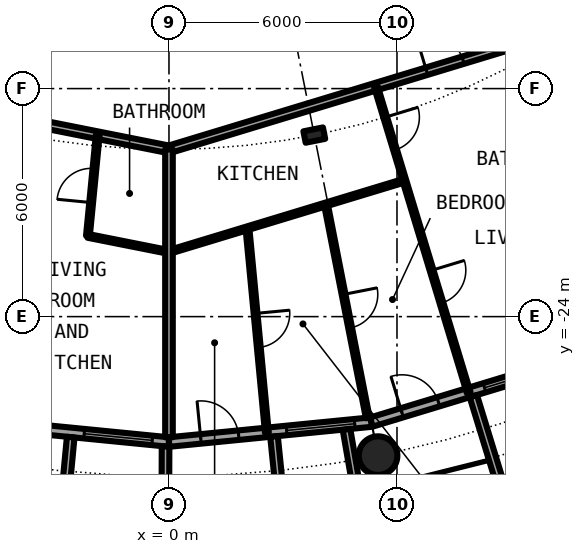
"""IFC4 building model, lengths in metres.
Left out: names, types, materials, properties, quantities, classifications, styles, units other than length and angle.
Written with IfcOpenShell. Run it as: python <this file> out.ifc"""

import sys

from ifc_helpers import new_model, si_unit, direction, frame, frame_2d, origin, origin_2d, place, context, subcontext, project, spatial, rectangle, circle, hollow_circle, i_section, extrude, element, fill, save


model = new_model("IFC4")
c1 = context("Model", 3, precision=1e-05, world=origin(), true_north=direction((0.0, 1.0)))
c2 = subcontext(c1, "Body", "Model", "MODEL_VIEW")
j1 = project(units=[si_unit("LENGTHUNIT", "METRE"), si_unit("PLANEANGLEUNIT", "RADIAN")], contexts=[c1])
p1 = place(None, origin())
s1 = spatial("IfcSite", under=j1, at=p1, CompositionType="ELEMENT")
p2 = place(p1, origin())
s2 = spatial("IfcBuilding", under=s1, at=p2, CompositionType="ELEMENT")
p3 = place(p2, frame((0.0, 0.0, 88.0)))
s3 = spatial("IfcBuildingStorey", under=s2, at=p3, CompositionType="ELEMENT", Elevation=88.0)
p4 = place(p3, frame((5.501, -27.658, 0.0), z_axis=(0.0, 0.0, 1.0), x_axis=(1.0, 0.0, 0.0)))
e1 = element("IfcColumn", 1, at=p4, inside=s3, PredefinedType="COLUMN", context=c2, shape_type="SweptSolid", body=[
    extrude(hollow_circle(Radius=0.508, WallThickness=0.04, at=origin_2d()), origin(), (0.0, 0.0, 1.0), 3.05),
])
p5 = place(p3, frame((3.824, -19.223, 0.0), z_axis=(0.0, 0.0, 1.0), x_axis=(0.195090322016, -0.980785280403, 0.0)))
e2 = element("IfcColumn", 2, at=p5, inside=s3, PredefinedType="COLUMN", context=c2, shape_type="SweptSolid", body=[
    extrude(i_section(OverallWidth=0.306, OverallDepth=0.524, WebThickness=0.021, FlangeThickness=0.04, FilletRadius=0.027, at=origin_2d()), origin(), (0.0, 0.0, 1.0), 3.05),
])
p6 = place(p3, frame((-5.326, -26.775, 0.0), z_axis=(0.0, 0.0, 1.0), x_axis=(0.995173996315, -0.098126026407, 0.0)))
e3 = element("IfcWall", 3, at=p6, inside=s3, PredefinedType="SOLIDWALL", context=c2, shape_type="SweptSolid", body=[
    extrude(rectangle(XDim=5.352, YDim=0.25, at=frame_2d((2.676, 0.0))), origin(), (0.0, 0.0, 1.0), 2.7),
])
p7 = place(p6, frame((0.841, 0.0, 0.0)))
e4 = element("IfcOpeningElement", 4, at=p7, cuts=e3, PredefinedType="OPENING", context=c2, shape_type="SweptSolid", body=[
    extrude(rectangle(XDim=1.0, YDim=2.2, at=frame_2d((0.5, 1.1))), frame((0.0, 0.135, 0.0), z_axis=(0.0, -1.0, 0.0), x_axis=(1.0, 0.0, 0.0)), (0.0, 0.0, 1.0), 0.27),
])
p8 = place(p6, frame((3.111, 0.0, 0.3)))
e5 = element("IfcOpeningElement", 5, at=p8, cuts=e3, PredefinedType="OPENING", context=c2, shape_type="SweptSolid", body=[
    extrude(rectangle(XDim=1.8, YDim=2.1, at=frame_2d((0.9, 1.05))), frame((0.0, 0.135, 0.0), z_axis=(0.0, -1.0, 0.0), x_axis=(1.0, 0.0, 0.0)), (0.0, 0.0, 1.0), 0.27),
])
p9 = place(p3, frame((-2.586, -27.171, -0.03), z_axis=(0.0, 0.0, 1.0), x_axis=(-0.094548432284, -0.995520262954, 0.0)))
e6 = element("IfcWall", 6, at=p9, inside=s3, PredefinedType="SOLIDWALL", context=c2, shape_type="SweptSolid", body=[
    extrude(rectangle(XDim=3.006, YDim=0.2, at=frame_2d((1.503, 0.0))), origin(), (0.0, 0.0, 1.0), 2.73),
])
p10 = place(p3, frame((-0.09, -27.417, -0.03), z_axis=(0.0, 0.0, 1.0), x_axis=(-0.00347308367, -0.999993968827, 0.0)))
e7 = element("IfcWall", 7, at=p10, inside=s3, PredefinedType="SOLIDWALL", context=c2, shape_type="SweptSolid", body=[
    extrude(rectangle(XDim=2.882, YDim=0.2, at=frame_2d((1.441, 0.0))), origin(), (0.0, 0.0, 1.0), 2.73),
])
p11 = place(p3, frame((0.0, -27.3, 0.0), z_axis=(0.0, 0.0, 1.0), x_axis=(0.995173996315, 0.098126026407, 0.0)))
e8 = element("IfcWall", 8, at=p11, inside=s3, PredefinedType="SOLIDWALL", context=c2, shape_type="SweptSolid", body=[
    extrude(rectangle(XDim=5.352, YDim=0.25, at=frame_2d((2.676, 0.0))), origin(), (0.0, 0.0, 1.0), 2.7),
])
p12 = place(p11, frame((0.841, 0.0, 0.0)))
e9 = element("IfcOpeningElement", 9, at=p12, cuts=e8, PredefinedType="OPENING", context=c2, shape_type="SweptSolid", body=[
    extrude(rectangle(XDim=1.0, YDim=2.2, at=frame_2d((0.5, 1.1))), frame((0.0, 0.135, 0.0), z_axis=(0.0, -1.0, 0.0), x_axis=(1.0, 0.0, 0.0)), (0.0, 0.0, 1.0), 0.27),
])
p13 = place(p11, frame((3.111, 0.0, 0.3)))
e10 = element("IfcOpeningElement", 10, at=p13, cuts=e8, PredefinedType="OPENING", context=c2, shape_type="SweptSolid", body=[
    extrude(rectangle(XDim=1.8, YDim=2.1, at=frame_2d((0.9, 1.05))), frame((0.0, 0.135, 0.0), z_axis=(0.0, -1.0, 0.0), x_axis=(1.0, 0.0, 0.0)), (0.0, 0.0, 1.0), 0.27),
])
p14 = place(p3, frame((2.764, -27.153, -0.03), z_axis=(0.0, 0.0, 1.0), x_axis=(0.101505487237, -0.994834979311, 0.0)))
e11 = element("IfcWall", 11, at=p14, inside=s3, PredefinedType="SOLIDWALL", context=c2, shape_type="SweptSolid", body=[
    extrude(rectangle(XDim=3.007, YDim=0.2, at=frame_2d((1.503, 0.0))), origin(), (0.0, 0.0, 1.0), 2.73),
])
p15 = place(p3, frame((4.671, -26.966, -0.03), z_axis=(0.0, 0.0, 1.0), x_axis=(0.170539878907, -0.985350774954, 0.0)))
e12 = element("IfcWall", 12, at=p15, inside=s3, PredefinedType="SOLIDWALL", context=c2, shape_type="SweptSolid", body=[
    extrude(rectangle(XDim=2.932, YDim=0.2, at=frame_2d((1.466, 0.0))), origin(), (0.0, 0.0, 1.0), 2.73),
])
p16 = place(p3, frame((5.326, -26.775, 0.0), z_axis=(0.0, 0.0, 1.0), x_axis=(0.956965678721, 0.290201119486, 0.0)))
e13 = element("IfcWall", 13, at=p16, inside=s3, PredefinedType="SOLIDWALL", context=c2, shape_type="SweptSolid", body=[
    extrude(rectangle(XDim=5.351, YDim=0.25, at=frame_2d((2.676, 0.0))), origin(), (0.0, 0.0, 1.0), 2.7),
])
p17 = place(p16, frame((0.841, 0.0, 0.0)))
e14 = element("IfcOpeningElement", 14, at=p17, cuts=e13, PredefinedType="OPENING", context=c2, shape_type="SweptSolid", body=[
    extrude(rectangle(XDim=1.0, YDim=2.2, at=frame_2d((0.5, 1.1))), frame((0.0, 0.135, 0.0), z_axis=(0.0, -1.0, 0.0), x_axis=(1.0, 0.0, 0.0)), (0.0, 0.0, 1.0), 0.27),
])
p18 = place(p16, frame((3.111, 0.0, 0.3)))
e15 = element("IfcOpeningElement", 15, at=p18, cuts=e13, PredefinedType="OPENING", context=c2, shape_type="SweptSolid", body=[
    extrude(rectangle(XDim=1.8, YDim=2.1, at=frame_2d((0.9, 1.05))), frame((0.0, 0.135, 0.0), z_axis=(0.0, -1.0, 0.0), x_axis=(1.0, 0.0, 0.0)), (0.0, 0.0, 1.0), 0.27),
])
p19 = place(p3, frame((8.82, -29.093, -0.03), z_axis=(0.0, 0.0, 1.0), x_axis=(0.941461077774, 0.337121697664, 0.0)))
e16 = element("IfcWall", 16, at=p19, inside=s3, PredefinedType="SOLIDWALL", context=c2, shape_type="SweptSolid", body=[
    extrude(rectangle(XDim=2.993, YDim=0.2, at=frame_2d((1.497, 0.0))), origin(), (0.0, 0.0, 1.0), 2.73),
])
p20 = place(p19, frame((0.457, 0.0, 0.33)))
e17 = element("IfcOpeningElement", 17, at=p20, cuts=e16, PredefinedType="OPENING", context=c2, shape_type="SweptSolid", body=[
    extrude(circle(Radius=1.04, at=frame_2d((1.04, 1.04))), frame((0.0, 0.11, 0.0), z_axis=(0.0, -1.0, 0.0), x_axis=(1.0, 0.0, 0.0)), (0.0, 0.0, 1.0), 0.22),
])
p21 = place(p3, frame((8.009, -26.092, -0.03), z_axis=(0.0, 0.0, 1.0), x_axis=(0.293406695073, -0.955987715029, 0.0)))
e18 = element("IfcWall", 18, at=p21, inside=s3, PredefinedType="SOLIDWALL", context=c2, shape_type="SweptSolid", body=[
    extrude(rectangle(XDim=3.006, YDim=0.2, at=frame_2d((1.503, 0.0))), origin(), (0.0, 0.0, 1.0), 2.73),
])
p22 = place(p3, frame((-2.133, -21.876, 0.0), z_axis=(0.0, 0.0, 1.0), x_axis=(0.980804550577, -0.194993419292, 0.0)))
e19 = element("IfcWall", 19, at=p22, inside=s3, PredefinedType="PARTITIONING", context=c2, shape_type="SweptSolid", body=[
    extrude(rectangle(XDim=2.175, YDim=0.1, at=frame_2d((1.087, 0.0))), origin(), (0.0, 0.0, 1.0), 2.7),
])
p23 = place(p3, frame((0.0, -22.3, 0.0), z_axis=(0.0, 0.0, 1.0), x_axis=(0.956940987612, 0.290282528286, 0.0)))
e20 = element("IfcWall", 20, at=p23, inside=s3, PredefinedType="PARTITIONING", context=c2, shape_type="SweptSolid", body=[
    extrude(rectangle(XDim=6.477, YDim=0.1, at=frame_2d((3.238, 0.0))), origin(), (0.0, 0.0, 1.0), 2.7),
])
p24 = place(p3, frame((-7.501, -18.108, 0.0), z_axis=(0.0, 0.0, 1.0), x_axis=(0.980781515054, -0.195109250749, 0.0)))
e21 = element("IfcWall", 21, at=p24, inside=s3, PredefinedType="PARTITIONING", context=c2, shape_type="SweptSolid", body=[
    extrude(rectangle(XDim=7.648, YDim=0.2, at=frame_2d((3.824, 0.0))), origin(), (0.0, 0.0, 1.0), 2.38),
])
p25 = place(p24, frame((2.25, 0.0, 0.0)))
e22 = element("IfcOpeningElement", 22, at=p25, cuts=e21, PredefinedType="OPENING", context=c2, shape_type="SweptSolid", body=[
    extrude(rectangle(XDim=1.0, YDim=2.3, at=frame_2d((0.5, 1.15))), frame((0.0, 0.11, 0.0), z_axis=(0.0, -1.0, 0.0), x_axis=(1.0, 0.0, 0.0)), (0.0, 0.0, 1.0), 0.22),
])
p26 = place(p3, frame((0.0, -19.6, 0.0), z_axis=(0.0, 0.0, 1.0), x_axis=(0.956932298225, 0.290311172044, 0.0)))
e23 = element("IfcWall", 23, at=p26, inside=s3, PredefinedType="PARTITIONING", context=c2, shape_type="SweptSolid", body=[
    extrude(rectangle(XDim=11.219, YDim=0.2, at=frame_2d((5.61, 0.0))), origin(), (0.0, 0.0, 1.0), 2.38),
])
p27 = place(p26, frame((7.086, 0.0, 0.0)))
e24 = element("IfcOpeningElement", 24, at=p27, cuts=e23, PredefinedType="OPENING", context=c2, shape_type="SweptSolid", body=[
    extrude(rectangle(XDim=1.0, YDim=2.3, at=frame_2d((0.5, 1.15))), frame((0.0, 0.11, 0.0), z_axis=(0.0, -1.0, 0.0), x_axis=(1.0, 0.0, 0.0)), (0.0, 0.0, 1.0), 0.22),
])
p28 = place(p3, frame((-2.133, -21.876, 0.0), z_axis=(0.0, 0.0, 1.0), x_axis=(0.096960338807, 0.995288246036, 0.0)))
e25 = element("IfcWall", 25, at=p28, inside=s3, PredefinedType="PARTITIONING", context=c2, shape_type="SweptSolid", body=[
    extrude(rectangle(XDim=2.661, YDim=0.1, at=frame_2d((1.331, 0.0))), origin(), (0.0, 0.0, 1.0), 2.7),
])
p29 = place(p28, frame((0.881, 0.0, 0.0)))
e26 = element("IfcOpeningElement", 26, at=p29, cuts=e25, PredefinedType="OPENING", context=c2, shape_type="SweptSolid", body=[
    extrude(rectangle(XDim=0.9, YDim=2.3, at=frame_2d((0.45, 1.15))), frame((0.0, 0.06, 0.0), z_axis=(0.0, -1.0, 0.0), x_axis=(1.0, 0.0, 0.0)), (0.0, 0.0, 1.0), 0.12),
])
p30 = place(p3, frame((0.0, -27.175, 0.0), z_axis=(0.0, 0.0, 1.0), x_axis=(0.0, 1.0, 0.0)))
e27 = element("IfcWall", 27, at=p30, inside=s3, PredefinedType="PARTITIONING", context=c2, shape_type="SweptSolid", body=[
    extrude(rectangle(XDim=7.575, YDim=0.2, at=frame_2d((3.788, 0.0))), origin(), (0.0, 0.0, 1.0), 2.7),
])
p31 = place(p3, frame((2.065, -21.674, 0.0), z_axis=(0.0, 0.0, 1.0), x_axis=(0.094751520537, -0.99550095397, 0.0)))
e28 = element("IfcWall", 28, at=p31, inside=s3, PredefinedType="PARTITIONING", context=c2, shape_type="SweptSolid", body=[
    extrude(rectangle(XDim=5.403, YDim=0.1, at=frame_2d((2.702, 0.0))), origin(), (0.0, 0.0, 1.0), 2.7),
])
p32 = place(p31, frame((2.252, 0.0, 0.0)))
e29 = element("IfcOpeningElement", 29, at=p32, cuts=e28, PredefinedType="OPENING", context=c2, shape_type="SweptSolid", body=[
    extrude(rectangle(XDim=0.9, YDim=2.3, at=frame_2d((0.45, 1.15))), frame((0.0, 0.06, 0.0), z_axis=(0.0, -1.0, 0.0), x_axis=(1.0, 0.0, 0.0)), (0.0, 0.0, 1.0), 0.12),
])
p33 = place(p3, frame((4.13, -21.047, 0.0), z_axis=(0.0, 0.0, 1.0), x_axis=(0.192433779325, -0.981309961518, 0.0)))
e30 = element("IfcWall", 30, at=p33, inside=s3, PredefinedType="PARTITIONING", context=c2, shape_type="SweptSolid", body=[
    extrude(rectangle(XDim=5.727, YDim=0.1, at=frame_2d((2.863, 0.0))), origin(), (0.0, 0.0, 1.0), 2.7),
])
p34 = place(p33, frame((2.414, 0.0, 0.0)))
e31 = element("IfcOpeningElement", 31, at=p34, cuts=e30, PredefinedType="OPENING", context=c2, shape_type="SweptSolid", body=[
    extrude(rectangle(XDim=0.9, YDim=2.3, at=frame_2d((0.45, 1.15))), frame((0.0, 0.06, 0.0), z_axis=(0.0, -1.0, 0.0), x_axis=(1.0, 0.0, 0.0)), (0.0, 0.0, 1.0), 0.12),
])
p35 = place(p3, frame((5.445, -17.948, 0.0), z_axis=(0.0, 0.0, 1.0), x_axis=(0.290158700753, -0.956978541231, 0.0)))
e32 = element("IfcWall", 32, at=p35, inside=s3, PredefinedType="PARTITIONING", context=c2, shape_type="SweptSolid", body=[
    extrude(rectangle(XDim=8.419, YDim=0.1, at=frame_2d((4.209, 0.0))), origin(), (0.0, 0.0, 1.0), 2.7),
])
p36 = place(p35, frame((0.842, 0.0, 0.0)))
e33 = element("IfcOpeningElement", 33, at=p36, cuts=e32, PredefinedType="OPENING", context=c2, shape_type="SweptSolid", body=[
    extrude(rectangle(XDim=0.9, YDim=2.3, at=frame_2d((0.45, 1.15))), frame((0.0, 0.06, 0.0), z_axis=(0.0, -1.0, 0.0), x_axis=(1.0, 0.0, 0.0)), (0.0, 0.0, 1.0), 0.12),
])
p37 = place(p35, frame((5.052, 0.0, 0.0)))
e34 = element("IfcOpeningElement", 34, at=p37, cuts=e32, PredefinedType="OPENING", context=c2, shape_type="SweptSolid", body=[
    extrude(rectangle(XDim=0.9, YDim=2.3, at=frame_2d((0.45, 1.15))), frame((0.0, 0.06, 0.0), z_axis=(0.0, -1.0, 0.0), x_axis=(1.0, 0.0, 0.0)), (0.0, 0.0, 1.0), 0.12),
])
p38 = place(p8, origin())
e35 = element("IfcWindow", 35, at=p38, inside=s3, PartitioningType="SINGLE_PANEL", PredefinedType="WINDOW", context=c2, shape_type="SweptSolid", body=[
    extrude(rectangle(XDim=1.8, YDim=2.1, at=frame_2d((0.9, 1.05))), frame((0.0, 0.03, 0.0), z_axis=(0.0, -1.0, 0.0), x_axis=(1.0, 0.0, 0.0)), (0.0, 0.0, 1.0), 0.06),
])
fill(e5, e35)
p39 = place(p12, origin())
e36 = element("IfcDoor", 36, at=p39, inside=s3, OperationType="SINGLE_SWING_LEFT", PredefinedType="DOOR", context=c2, shape_type="SweptSolid", body=[
    extrude(rectangle(XDim=1.0, YDim=2.2, at=frame_2d((0.5, 1.1))), frame((0.0, 0.025, 0.0), z_axis=(0.0, -1.0, 0.0), x_axis=(1.0, 0.0, 0.0)), (0.0, 0.0, 1.0), 0.05),
])
fill(e9, e36)
p40 = place(p13, origin())
e37 = element("IfcWindow", 37, at=p40, inside=s3, PartitioningType="SINGLE_PANEL", PredefinedType="WINDOW", context=c2, shape_type="SweptSolid", body=[
    extrude(rectangle(XDim=1.8, YDim=2.1, at=frame_2d((0.9, 1.05))), frame((0.0, 0.03, 0.0), z_axis=(0.0, -1.0, 0.0), x_axis=(1.0, 0.0, 0.0)), (0.0, 0.0, 1.0), 0.06),
])
fill(e10, e37)
p41 = place(p17, origin())
e38 = element("IfcDoor", 38, at=p41, inside=s3, OperationType="SINGLE_SWING_LEFT", PredefinedType="DOOR", context=c2, shape_type="SweptSolid", body=[
    extrude(rectangle(XDim=1.0, YDim=2.2, at=frame_2d((0.5, 1.1))), frame((0.0, 0.025, 0.0), z_axis=(0.0, -1.0, 0.0), x_axis=(1.0, 0.0, 0.0)), (0.0, 0.0, 1.0), 0.05),
])
fill(e14, e38)
p42 = place(p18, origin())
e39 = element("IfcWindow", 39, at=p42, inside=s3, PartitioningType="SINGLE_PANEL", PredefinedType="WINDOW", context=c2, shape_type="SweptSolid", body=[
    extrude(rectangle(XDim=1.8, YDim=2.1, at=frame_2d((0.9, 1.05))), frame((0.0, 0.03, 0.0), z_axis=(0.0, -1.0, 0.0), x_axis=(1.0, 0.0, 0.0)), (0.0, 0.0, 1.0), 0.06),
])
fill(e15, e39)
p43 = place(p29, origin())
e40 = element("IfcDoor", 40, at=p43, inside=s3, OperationType="SINGLE_SWING_LEFT", PredefinedType="DOOR", context=c2, shape_type="SweptSolid", body=[
    extrude(rectangle(XDim=0.9, YDim=2.3, at=frame_2d((0.45, 1.15))), frame((0.0, 0.025, 0.0), z_axis=(0.0, -1.0, 0.0), x_axis=(1.0, 0.0, 0.0)), (0.0, 0.0, 1.0), 0.05),
])
fill(e26, e40)
p44 = place(p27, origin())
e41 = element("IfcDoor", 41, at=p44, inside=s3, OperationType="SINGLE_SWING_RIGHT", PredefinedType="DOOR", context=c2, shape_type="SweptSolid", body=[
    extrude(rectangle(XDim=1.0, YDim=2.3, at=frame_2d((0.5, 1.15))), frame((0.0, 0.025, 0.0), z_axis=(0.0, -1.0, 0.0), x_axis=(1.0, 0.0, 0.0)), (0.0, 0.0, 1.0), 0.05),
])
fill(e24, e41)
p45 = place(p36, origin())
e42 = element("IfcDoor", 42, at=p45, inside=s3, OperationType="SINGLE_SWING_LEFT", PredefinedType="DOOR", context=c2, shape_type="SweptSolid", body=[
    extrude(rectangle(XDim=0.9, YDim=2.3, at=frame_2d((0.45, 1.15))), frame((0.0, 0.025, 0.0), z_axis=(0.0, -1.0, 0.0), x_axis=(1.0, 0.0, 0.0)), (0.0, 0.0, 1.0), 0.05),
])
fill(e33, e42)
p46 = place(p37, origin())
e43 = element("IfcDoor", 43, at=p46, inside=s3, OperationType="SINGLE_SWING_RIGHT", PredefinedType="DOOR", context=c2, shape_type="SweptSolid", body=[
    extrude(rectangle(XDim=0.9, YDim=2.3, at=frame_2d((0.45, 1.15))), frame((0.0, 0.025, 0.0), z_axis=(0.0, -1.0, 0.0), x_axis=(1.0, 0.0, 0.0)), (0.0, 0.0, 1.0), 0.05),
])
fill(e34, e43)
p47 = place(p34, origin())
e44 = element("IfcDoor", 44, at=p47, inside=s3, OperationType="SINGLE_SWING_RIGHT", PredefinedType="DOOR", context=c2, shape_type="SweptSolid", body=[
    extrude(rectangle(XDim=0.9, YDim=2.3, at=frame_2d((0.45, 1.15))), frame((0.0, 0.025, 0.0), z_axis=(0.0, -1.0, 0.0), x_axis=(1.0, 0.0, 0.0)), (0.0, 0.0, 1.0), 0.05),
])
fill(e31, e44)
p48 = place(p32, origin())
e45 = element("IfcDoor", 45, at=p48, inside=s3, OperationType="SINGLE_SWING_LEFT", PredefinedType="DOOR", context=c2, shape_type="SweptSolid", body=[
    extrude(rectangle(XDim=0.9, YDim=2.3, at=frame_2d((0.45, 1.15))), frame((0.0, 0.025, 0.0), z_axis=(0.0, -1.0, 0.0), x_axis=(1.0, 0.0, 0.0)), (0.0, 0.0, 1.0), 0.05),
])
fill(e29, e45)
save(model, sys.argv[1])
